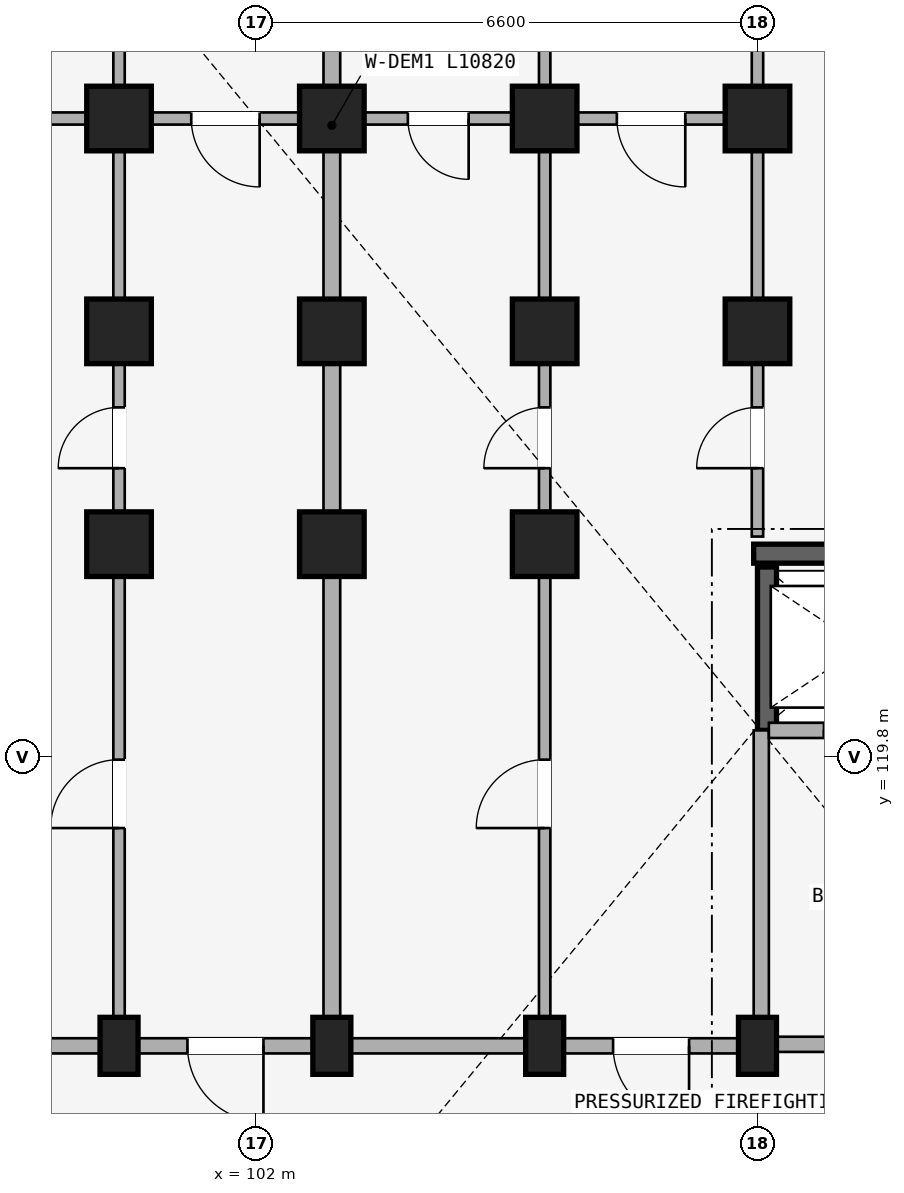
"""IFC4 building model, lengths in metres.
Left out: names, types, materials, properties, quantities, classifications, styles, units other than length and angle.
Written with IfcOpenShell. Run it as: python <this file> out.ifc"""

import sys

from ifc_helpers import new_model, si_unit, direction, frame, frame_2d, origin, origin_2d, place, context, subcontext, project, spatial, rectangle, extrude, element, fill, save


model = new_model("IFC4")
c1 = context("Model", 3, precision=1e-05, world=origin(), true_north=direction((0.0, 1.0)))
c2 = subcontext(c1, "Body", "Model", "MODEL_VIEW")
j1 = project(units=[si_unit("LENGTHUNIT", "METRE"), si_unit("PLANEANGLEUNIT", "RADIAN")], contexts=[c1])
p1 = place(None, origin())
s1 = spatial("IfcSite", under=j1, at=p1, CompositionType="ELEMENT")
p2 = place(p1, origin())
s2 = spatial("IfcBuilding", under=s1, at=p2, CompositionType="ELEMENT")
p3 = place(p2, origin())
s3 = spatial("IfcBuildingStorey", under=s2, at=p3, CompositionType="ELEMENT", Elevation=0.0)
p4 = place(p3, frame((111.35, 122.475, 0.0), z_axis=(0.0, 0.0, 1.0), x_axis=(-1.0, 0.0, 0.0)))
e1 = element("IfcWall", 1, at=p4, inside=s3, PredefinedType="SHEAR", context=c2, shape_type="SweptSolid", body=[
    extrude(rectangle(XDim=2.8, YDim=0.25, at=frame_2d((1.4, 0.0))), origin(), (0.0, 0.0, 1.0), 4.15),
])
p5 = place(p3, frame((108.725, 120.15, 0.0), z_axis=(0.0, 0.0, 1.0), x_axis=(0.0, 1.0, 0.0)))
e2 = element("IfcWall", 2, at=p5, inside=s3, PredefinedType="SHEAR", context=c2, shape_type="SweptSolid", body=[
    extrude(rectangle(XDim=2.15, YDim=0.25, at=frame_2d((1.075, 0.0))), origin(), (0.0, 0.0, 1.0), 4.15),
])
p6 = place(p3, frame((108.6, 116.0, 0.0), z_axis=(0.0, 0.0, 1.0), x_axis=(1.0, 0.0, 0.0)))
e3 = element("IfcColumn", 3, at=p6, inside=s3, PredefinedType="COLUMN", context=c2, shape_type="SweptSolid", body=[
    extrude(rectangle(XDim=0.5, YDim=0.75, at=origin_2d()), origin(), (0.0, 0.0, 1.0), 4.15),
])
for number, where, z_axis, x_axis in (
    (4, (108.6, 125.4, 0.0), (0.0, 0.0, 1.0), (1.0, 0.0, 0.0)),
    (5, (108.6, 128.2, 0.0), (0.0, 0.0, 1.0), (1.0, 0.0, 0.0)),
):
    element("IfcColumn", number, at=place(p3, frame(where, z_axis=z_axis, x_axis=x_axis)), inside=s3, PredefinedType="COLUMN", context=c2, shape_type="SweptSolid", body=[
        extrude(rectangle(XDim=0.85, YDim=0.85, at=origin_2d()), origin(), (0.0, 0.0, 1.0), 4.15),
    ])
p7 = place(p3, frame((105.8, 116.0, 0.0), z_axis=(0.0, 0.0, 1.0), x_axis=(1.0, 0.0, 0.0)))
e6 = element("IfcColumn", 6, at=p7, inside=s3, PredefinedType="COLUMN", context=c2, shape_type="SweptSolid", body=[
    extrude(rectangle(XDim=0.5, YDim=0.75, at=origin_2d()), origin(), (0.0, 0.0, 1.0), 4.15),
])
for number, where, z_axis, x_axis in (
    (7, (105.8, 122.6, 0.0), (0.0, 0.0, 1.0), (1.0, 0.0, 0.0)),
    (8, (105.8, 125.4, 0.0), (0.0, 0.0, 1.0), (1.0, 0.0, 0.0)),
    (9, (105.8, 128.2, 0.0), (0.0, 0.0, 1.0), (1.0, 0.0, 0.0)),
):
    element("IfcColumn", number, at=place(p3, frame(where, z_axis=z_axis, x_axis=x_axis)), inside=s3, PredefinedType="COLUMN", context=c2, shape_type="SweptSolid", body=[
        extrude(rectangle(XDim=0.85, YDim=0.85, at=origin_2d()), origin(), (0.0, 0.0, 1.0), 4.15),
    ])
p8 = place(p3, frame((103.0, 116.0, 0.0), z_axis=(0.0, 0.0, 1.0), x_axis=(1.0, 0.0, 0.0)))
e10 = element("IfcColumn", 10, at=p8, inside=s3, PredefinedType="COLUMN", context=c2, shape_type="SweptSolid", body=[
    extrude(rectangle(XDim=0.5, YDim=0.75, at=origin_2d()), origin(), (0.0, 0.0, 1.0), 4.15),
])
for number, where, z_axis, x_axis in (
    (11, (103.0, 122.6, 0.0), (0.0, 0.0, 1.0), (1.0, 0.0, 0.0)),
    (12, (103.0, 125.4, 0.0), (0.0, 0.0, 1.0), (1.0, 0.0, 0.0)),
    (13, (103.0, 128.2, 0.0), (0.0, 0.0, 1.0), (1.0, 0.0, 0.0)),
):
    element("IfcColumn", number, at=place(p3, frame(where, z_axis=z_axis, x_axis=x_axis)), inside=s3, PredefinedType="COLUMN", context=c2, shape_type="SweptSolid", body=[
        extrude(rectangle(XDim=0.85, YDim=0.85, at=origin_2d()), origin(), (0.0, 0.0, 1.0), 4.15),
    ])
p9 = place(p3, frame((100.2, 116.0, 0.0), z_axis=(0.0, 0.0, 1.0), x_axis=(1.0, 0.0, 0.0)))
e14 = element("IfcColumn", 14, at=p9, inside=s3, PredefinedType="COLUMN", context=c2, shape_type="SweptSolid", body=[
    extrude(rectangle(XDim=0.5, YDim=0.75, at=origin_2d()), origin(), (0.0, 0.0, 1.0), 4.15),
])
for number, where, z_axis, x_axis in (
    (15, (100.2, 122.6, 0.0), (0.0, 0.0, 1.0), (1.0, 0.0, 0.0)),
    (16, (100.2, 125.4, 0.0), (0.0, 0.0, 1.0), (1.0, 0.0, 0.0)),
    (17, (100.2, 128.2, 0.0), (0.0, 0.0, 1.0), (1.0, 0.0, 0.0)),
):
    element("IfcColumn", number, at=place(p3, frame(where, z_axis=z_axis, x_axis=x_axis)), inside=s3, PredefinedType="COLUMN", context=c2, shape_type="SweptSolid", body=[
        extrude(rectangle(XDim=0.85, YDim=0.85, at=origin_2d()), origin(), (0.0, 0.0, 1.0), 4.15),
    ])
p10 = place(p3, frame((114.3, 116.02, 0.0), z_axis=(0.0, 0.0, 1.0), x_axis=(-1.0, 0.0, 0.0)))
e18 = element("IfcWall", 18, at=p10, inside=s3, PredefinedType="STANDARD", context=c2, shape_type="SweptSolid", body=[
    extrude(rectangle(XDim=5.65, YDim=0.2, at=frame_2d((2.825, 0.0))), origin(), (0.0, 0.0, 1.0), 3.492),
])
p11 = place(p10, frame((1.923, 0.0, 0.0)))
e19 = element("IfcOpeningElement", 19, at=p11, cuts=e18, PredefinedType="OPENING", context=c2, shape_type="SweptSolid", body=[
    extrude(rectangle(XDim=1.24, YDim=2.15, at=frame_2d((0.62, 1.075))), frame((0.0, 0.11, 0.0), z_axis=(0.0, -1.0, 0.0), x_axis=(1.0, 0.0, 0.0)), (0.0, 0.0, 1.0), 0.22),
])
p12 = place(p3, frame((108.65, 116.02, 0.0), z_axis=(0.0, 0.0, 1.0), x_axis=(0.0, 1.0, 0.0)))
e20 = element("IfcWall", 20, at=p12, inside=s3, PredefinedType="STANDARD", context=c2, shape_type="SweptSolid", body=[
    extrude(rectangle(XDim=4.13, YDim=0.2, at=frame_2d((2.065, 0.0))), origin(), (0.0, 0.0, 1.0), 3.492),
])
p13 = place(p3, frame((111.3, 120.15, 0.0), z_axis=(0.0, 0.0, 1.0), x_axis=(-1.0, 0.0, 0.0)))
e21 = element("IfcWall", 21, at=p13, inside=s3, PredefinedType="STANDARD", context=c2, shape_type="SweptSolid", body=[
    extrude(rectangle(XDim=2.55, YDim=0.2, at=frame_2d((1.275, 0.0))), origin(), (0.0, 0.0, 1.0), 3.492),
])
p14 = place(p13, frame((0.725, 0.0, 0.0)))
e22 = element("IfcOpeningElement", 22, at=p14, cuts=e21, PredefinedType="OPENING", context=c2, shape_type="SweptSolid", body=[
    extrude(rectangle(XDim=1.1, YDim=2.15, at=frame_2d((0.55, 1.075))), frame((0.0, 0.11, 0.0), z_axis=(0.0, -1.0, 0.0), x_axis=(1.0, 0.0, 0.0)), (0.0, 0.0, 1.0), 0.22),
])
p15 = place(p3, frame((108.6, 116.0, 0.0), z_axis=(0.0, 0.0, 1.0), x_axis=(-1.0, 0.0, 0.0)))
e23 = element("IfcWall", 23, at=p15, inside=s3, PredefinedType="STANDARD", context=c2, shape_type="SweptSolid", body=[
    extrude(rectangle(XDim=2.8, YDim=0.2, at=frame_2d((1.4, 0.0))), origin(), (0.0, 0.0, 1.0), 3.492),
])
p16 = place(p15, frame((0.9, 0.0, 0.0)))
e24 = element("IfcOpeningElement", 24, at=p16, cuts=e23, PredefinedType="OPENING", context=c2, shape_type="SweptSolid", body=[
    extrude(rectangle(XDim=1.0, YDim=2.15, at=frame_2d((0.5, 1.075))), frame((0.0, 0.11, 0.0), z_axis=(0.0, -1.0, 0.0), x_axis=(1.0, 0.0, 0.0)), (0.0, 0.0, 1.0), 0.22),
])
p17 = place(p3, frame((108.52, 128.2, 0.0), z_axis=(0.0, 0.0, 1.0), x_axis=(-1.0, 0.0, 0.0)))
e25 = element("IfcWall", 25, at=p17, inside=s3, PredefinedType="PLUMBINGWALL", context=c2, shape_type="SweptSolid", body=[
    extrude(rectangle(XDim=2.64, YDim=0.16, at=frame_2d((1.32, 0.0))), origin(), (0.0, 0.0, 1.0), 3.492),
])
p18 = place(p17, frame((0.87, 0.0, 0.0)))
e26 = element("IfcOpeningElement", 26, at=p18, cuts=e25, PredefinedType="OPENING", context=c2, shape_type="SweptSolid", body=[
    extrude(rectangle(XDim=0.9, YDim=2.1, at=frame_2d((0.45, 1.05))), frame((0.0, 0.09, 0.0), z_axis=(0.0, -1.0, 0.0), x_axis=(1.0, 0.0, 0.0)), (0.0, 0.0, 1.0), 0.18),
])
p19 = place(p3, frame((105.8, 116.0, 0.0), z_axis=(0.0, 0.0, 1.0), x_axis=(-1.0, 0.0, 0.0)))
e27 = element("IfcWall", 27, at=p19, inside=s3, PredefinedType="STANDARD", context=c2, shape_type="SweptSolid", body=[
    extrude(rectangle(XDim=2.8, YDim=0.2, at=frame_2d((1.4, 0.0))), origin(), (0.0, 0.0, 1.0), 3.492),
])
p20 = place(p3, frame((105.72, 128.2, 0.0), z_axis=(0.0, 0.0, 1.0), x_axis=(-1.0, 0.0, 0.0)))
e28 = element("IfcWall", 28, at=p20, inside=s3, PredefinedType="PLUMBINGWALL", context=c2, shape_type="SweptSolid", body=[
    extrude(rectangle(XDim=2.64, YDim=0.16, at=frame_2d((1.32, 0.0))), origin(), (0.0, 0.0, 1.0), 3.492),
])
p21 = place(p20, frame((0.92, 0.0, 0.0)))
e29 = element("IfcOpeningElement", 29, at=p21, cuts=e28, PredefinedType="OPENING", context=c2, shape_type="SweptSolid", body=[
    extrude(rectangle(XDim=0.8, YDim=2.1, at=frame_2d((0.4, 1.05))), frame((0.0, 0.09, 0.0), z_axis=(0.0, -1.0, 0.0), x_axis=(1.0, 0.0, 0.0)), (0.0, 0.0, 1.0), 0.18),
])
p22 = place(p3, frame((103.0, 116.0, 0.0), z_axis=(0.0, 0.0, 1.0), x_axis=(-1.0, 0.0, 0.0)))
e30 = element("IfcWall", 30, at=p22, inside=s3, PredefinedType="STANDARD", context=c2, shape_type="SweptSolid", body=[
    extrude(rectangle(XDim=2.8, YDim=0.2, at=frame_2d((1.4, 0.0))), origin(), (0.0, 0.0, 1.0), 3.492),
])
p23 = place(p22, frame((0.9, 0.0, 0.0)))
e31 = element("IfcOpeningElement", 31, at=p23, cuts=e30, PredefinedType="OPENING", context=c2, shape_type="SweptSolid", body=[
    extrude(rectangle(XDim=1.0, YDim=2.15, at=frame_2d((0.5, 1.075))), frame((0.0, 0.11, 0.0), z_axis=(0.0, -1.0, 0.0), x_axis=(1.0, 0.0, 0.0)), (0.0, 0.0, 1.0), 0.22),
])
p24 = place(p3, frame((102.92, 128.2, 0.0), z_axis=(0.0, 0.0, 1.0), x_axis=(-1.0, 0.0, 0.0)))
e32 = element("IfcWall", 32, at=p24, inside=s3, PredefinedType="PLUMBINGWALL", context=c2, shape_type="SweptSolid", body=[
    extrude(rectangle(XDim=2.64, YDim=0.16, at=frame_2d((1.32, 0.0))), origin(), (0.0, 0.0, 1.0), 3.492),
])
p25 = place(p24, frame((0.87, 0.0, 0.0)))
e33 = element("IfcOpeningElement", 33, at=p25, cuts=e32, PredefinedType="OPENING", context=c2, shape_type="SweptSolid", body=[
    extrude(rectangle(XDim=0.9, YDim=2.1, at=frame_2d((0.45, 1.05))), frame((0.0, 0.09, 0.0), z_axis=(0.0, -1.0, 0.0), x_axis=(1.0, 0.0, 0.0)), (0.0, 0.0, 1.0), 0.18),
])
p26 = place(p3, frame((100.2, 116.0, 0.0), z_axis=(0.0, 0.0, 1.0), x_axis=(-1.0, 0.0, 0.0)))
e34 = element("IfcWall", 34, at=p26, inside=s3, PredefinedType="STANDARD", context=c2, shape_type="SweptSolid", body=[
    extrude(rectangle(XDim=2.8, YDim=0.2, at=frame_2d((1.4, 0.0))), origin(), (0.0, 0.0, 1.0), 3.492),
])
p27 = place(p3, frame((100.12, 128.2, 0.0), z_axis=(0.0, 0.0, 1.0), x_axis=(-1.0, 0.0, 0.0)))
e35 = element("IfcWall", 35, at=p27, inside=s3, PredefinedType="PLUMBINGWALL", context=c2, shape_type="SweptSolid", body=[
    extrude(rectangle(XDim=2.64, YDim=0.16, at=frame_2d((1.32, 0.0))), origin(), (0.0, 0.0, 1.0), 3.492),
])
p28 = place(p27, frame((0.92, 0.0, 0.0)))
e36 = element("IfcOpeningElement", 36, at=p28, cuts=e35, PredefinedType="OPENING", context=c2, shape_type="SweptSolid", body=[
    extrude(rectangle(XDim=0.8, YDim=2.1, at=frame_2d((0.4, 1.05))), frame((0.0, 0.09, 0.0), z_axis=(0.0, -1.0, 0.0), x_axis=(1.0, 0.0, 0.0)), (0.0, 0.0, 1.0), 0.18),
])
p29 = place(p3, frame((108.6, 122.7, 0.0), z_axis=(0.0, 0.0, 1.0), x_axis=(0.0, 1.0, 0.0)))
e37 = element("IfcWall", 37, at=p29, inside=s3, PredefinedType="PARTITIONING", context=c2, shape_type="SweptSolid", body=[
    extrude(rectangle(XDim=10.82, YDim=0.15, at=frame_2d((5.41, 0.0))), origin(), (0.0, 0.0, 1.0), 3.492),
])
p30 = place(p29, frame((0.899, 0.0, 0.0)))
e38 = element("IfcOpeningElement", 38, at=p30, cuts=e37, PredefinedType="OPENING", context=c2, shape_type="SweptSolid", body=[
    extrude(rectangle(XDim=0.8, YDim=2.1, at=frame_2d((0.4, 1.05))), frame((0.0, 0.085, 0.0), z_axis=(0.0, -1.0, 0.0), x_axis=(1.0, 0.0, 0.0)), (0.0, 0.0, 1.0), 0.17),
])
p31 = place(p3, frame((105.8, 116.05, 0.0), z_axis=(0.0, 0.0, 1.0), x_axis=(0.0, 1.0, 0.0)))
e39 = element("IfcWall", 39, at=p31, inside=s3, PredefinedType="PARTITIONING", context=c2, shape_type="SweptSolid", body=[
    extrude(rectangle(XDim=6.53, YDim=0.15, at=frame_2d((3.265, 0.0))), origin(), (0.0, 0.0, 1.0), 3.492),
])
p32 = place(p31, frame((2.815, 0.0, 0.0)))
e40 = element("IfcOpeningElement", 40, at=p32, cuts=e39, PredefinedType="OPENING", context=c2, shape_type="SweptSolid", body=[
    extrude(rectangle(XDim=0.9, YDim=2.1, at=frame_2d((0.45, 1.05))), frame((0.0, 0.085, 0.0), z_axis=(0.0, -1.0, 0.0), x_axis=(1.0, 0.0, 0.0)), (0.0, 0.0, 1.0), 0.17),
])
p33 = place(p3, frame((105.8, 122.7, 0.0), z_axis=(0.0, 0.0, 1.0), x_axis=(0.0, 1.0, 0.0)))
e41 = element("IfcWall", 41, at=p33, inside=s3, PredefinedType="PARTITIONING", context=c2, shape_type="SweptSolid", body=[
    extrude(rectangle(XDim=10.82, YDim=0.15, at=frame_2d((5.41, 0.0))), origin(), (0.0, 0.0, 1.0), 3.492),
])
p34 = place(p33, frame((0.899, 0.0, 0.0)))
e42 = element("IfcOpeningElement", 42, at=p34, cuts=e41, PredefinedType="OPENING", context=c2, shape_type="SweptSolid", body=[
    extrude(rectangle(XDim=0.8, YDim=2.1, at=frame_2d((0.4, 1.05))), frame((0.0, 0.085, 0.0), z_axis=(0.0, -1.0, 0.0), x_axis=(1.0, 0.0, 0.0)), (0.0, 0.0, 1.0), 0.17),
])
p35 = place(p3, frame((103.0, 116.05, 0.0), z_axis=(0.0, 0.0, 1.0), x_axis=(0.0, 1.0, 0.0)))
e43 = element("IfcWall", 43, at=p35, inside=s3, PredefinedType="STANDARD", context=c2, shape_type="SweptSolid", body=[
    extrude(rectangle(XDim=6.53, YDim=0.22, at=frame_2d((3.265, 0.0))), origin(), (0.0, 0.0, 1.0), 3.492),
])
p36 = place(p3, frame((103.0, 122.7, 0.0), z_axis=(0.0, 0.0, 1.0), x_axis=(0.0, 1.0, 0.0)))
e44 = element("IfcWall", 44, at=p36, inside=s3, PredefinedType="STANDARD", context=c2, shape_type="SweptSolid", body=[
    extrude(rectangle(XDim=10.82, YDim=0.22, at=frame_2d((5.41, 0.0))), origin(), (0.0, 0.0, 1.0), 3.492),
])
p37 = place(p3, frame((100.2, 116.05, 0.0), z_axis=(0.0, 0.0, 1.0), x_axis=(0.0, 1.0, 0.0)))
e45 = element("IfcWall", 45, at=p37, inside=s3, PredefinedType="PARTITIONING", context=c2, shape_type="SweptSolid", body=[
    extrude(rectangle(XDim=6.53, YDim=0.15, at=frame_2d((3.265, 0.0))), origin(), (0.0, 0.0, 1.0), 3.492),
])
p38 = place(p37, frame((2.815, 0.0, 0.0)))
e46 = element("IfcOpeningElement", 46, at=p38, cuts=e45, PredefinedType="OPENING", context=c2, shape_type="SweptSolid", body=[
    extrude(rectangle(XDim=0.9, YDim=2.1, at=frame_2d((0.45, 1.05))), frame((0.0, 0.085, 0.0), z_axis=(0.0, -1.0, 0.0), x_axis=(1.0, 0.0, 0.0)), (0.0, 0.0, 1.0), 0.17),
])
p39 = place(p3, frame((100.2, 122.7, 0.0), z_axis=(0.0, 0.0, 1.0), x_axis=(0.0, 1.0, 0.0)))
e47 = element("IfcWall", 47, at=p39, inside=s3, PredefinedType="PARTITIONING", context=c2, shape_type="SweptSolid", body=[
    extrude(rectangle(XDim=10.82, YDim=0.15, at=frame_2d((5.41, 0.0))), origin(), (0.0, 0.0, 1.0), 3.492),
])
p40 = place(p39, frame((0.899, 0.0, 0.0)))
e48 = element("IfcOpeningElement", 48, at=p40, cuts=e47, PredefinedType="OPENING", context=c2, shape_type="SweptSolid", body=[
    extrude(rectangle(XDim=0.8, YDim=2.1, at=frame_2d((0.4, 1.05))), frame((0.0, 0.085, 0.0), z_axis=(0.0, -1.0, 0.0), x_axis=(1.0, 0.0, 0.0)), (0.0, 0.0, 1.0), 0.17),
])
p41 = place(p14, origin())
e49 = element("IfcDoor", 49, at=p41, inside=s3, OperationType="SLIDING_TO_LEFT", PredefinedType="DOOR", context=c2, shape_type="SweptSolid", body=[
    extrude(rectangle(XDim=1.1, YDim=2.15, at=frame_2d((0.55, 1.075))), frame((0.0, 0.025, 0.0), z_axis=(0.0, -1.0, 0.0), x_axis=(1.0, 0.0, 0.0)), (0.0, 0.0, 1.0), 0.05),
])
fill(e22, e49)
p42 = place(p18, origin())
e50 = element("IfcDoor", 50, at=p42, inside=s3, OperationType="SINGLE_SWING_LEFT", PredefinedType="DOOR", context=c2, shape_type="SweptSolid", body=[
    extrude(rectangle(XDim=0.9, YDim=2.1, at=frame_2d((0.45, 1.05))), frame((0.0, 0.025, 0.0), z_axis=(0.0, -1.0, 0.0), x_axis=(1.0, 0.0, 0.0)), (0.0, 0.0, 1.0), 0.05),
])
fill(e26, e50)
p43 = place(p16, frame((1.0, 0.0, 0.0), z_axis=(0.0, 0.0, 1.0), x_axis=(-1.0, 0.0, 0.0)))
e51 = element("IfcDoor", 51, at=p43, inside=s3, OperationType="SINGLE_SWING_RIGHT", PredefinedType="DOOR", context=c2, shape_type="SweptSolid", body=[
    extrude(rectangle(XDim=1.0, YDim=2.15, at=frame_2d((0.5, 1.075))), frame((0.0, 0.025, 0.0), z_axis=(0.0, -1.0, 0.0), x_axis=(1.0, 0.0, 0.0)), (0.0, 0.0, 1.0), 0.05),
])
fill(e24, e51)
p44 = place(p21, origin())
e52 = element("IfcDoor", 52, at=p44, inside=s3, OperationType="SINGLE_SWING_LEFT", PredefinedType="DOOR", context=c2, shape_type="SweptSolid", body=[
    extrude(rectangle(XDim=0.8, YDim=2.1, at=frame_2d((0.4, 1.05))), frame((0.0, 0.025, 0.0), z_axis=(0.0, -1.0, 0.0), x_axis=(1.0, 0.0, 0.0)), (0.0, 0.0, 1.0), 0.05),
])
fill(e29, e52)
p45 = place(p25, origin())
e53 = element("IfcDoor", 53, at=p45, inside=s3, OperationType="SINGLE_SWING_LEFT", PredefinedType="DOOR", context=c2, shape_type="SweptSolid", body=[
    extrude(rectangle(XDim=0.9, YDim=2.1, at=frame_2d((0.45, 1.05))), frame((0.0, 0.025, 0.0), z_axis=(0.0, -1.0, 0.0), x_axis=(1.0, 0.0, 0.0)), (0.0, 0.0, 1.0), 0.05),
])
fill(e33, e53)
p46 = place(p23, frame((1.0, 0.0, 0.0), z_axis=(0.0, 0.0, 1.0), x_axis=(-1.0, 0.0, 0.0)))
e54 = element("IfcDoor", 54, at=p46, inside=s3, OperationType="SINGLE_SWING_RIGHT", PredefinedType="DOOR", context=c2, shape_type="SweptSolid", body=[
    extrude(rectangle(XDim=1.0, YDim=2.15, at=frame_2d((0.5, 1.075))), frame((0.0, 0.025, 0.0), z_axis=(0.0, -1.0, 0.0), x_axis=(1.0, 0.0, 0.0)), (0.0, 0.0, 1.0), 0.05),
])
fill(e31, e54)
p47 = place(p30, frame((0.8, 0.0, 0.0), z_axis=(0.0, 0.0, 1.0), x_axis=(-1.0, 0.0, 0.0)))
e55 = element("IfcDoor", 55, at=p47, inside=s3, OperationType="SINGLE_SWING_RIGHT", PredefinedType="DOOR", context=c2, shape_type="SweptSolid", body=[
    extrude(rectangle(XDim=0.8, YDim=2.1, at=frame_2d((0.4, 1.05))), frame((0.0, 0.025, 0.0), z_axis=(0.0, -1.0, 0.0), x_axis=(1.0, 0.0, 0.0)), (0.0, 0.0, 1.0), 0.05),
])
fill(e38, e55)
p48 = place(p32, frame((0.9, 0.0, 0.0), z_axis=(0.0, 0.0, 1.0), x_axis=(-1.0, 0.0, 0.0)))
e56 = element("IfcDoor", 56, at=p48, inside=s3, OperationType="SINGLE_SWING_RIGHT", PredefinedType="DOOR", context=c2, shape_type="SweptSolid", body=[
    extrude(rectangle(XDim=0.9, YDim=2.1, at=frame_2d((0.45, 1.05))), frame((0.0, 0.025, 0.0), z_axis=(0.0, -1.0, 0.0), x_axis=(1.0, 0.0, 0.0)), (0.0, 0.0, 1.0), 0.05),
])
fill(e40, e56)
p49 = place(p34, origin())
e57 = element("IfcDoor", 57, at=p49, inside=s3, OperationType="SINGLE_SWING_LEFT", PredefinedType="DOOR", context=c2, shape_type="SweptSolid", body=[
    extrude(rectangle(XDim=0.8, YDim=2.1, at=frame_2d((0.4, 1.05))), frame((0.0, 0.025, 0.0), z_axis=(0.0, -1.0, 0.0), x_axis=(1.0, 0.0, 0.0)), (0.0, 0.0, 1.0), 0.05),
])
fill(e42, e57)
p50 = place(p38, origin())
e58 = element("IfcDoor", 58, at=p50, inside=s3, OperationType="SINGLE_SWING_LEFT", PredefinedType="DOOR", context=c2, shape_type="SweptSolid", body=[
    extrude(rectangle(XDim=0.9, YDim=2.1, at=frame_2d((0.45, 1.05))), frame((0.0, 0.025, 0.0), z_axis=(0.0, -1.0, 0.0), x_axis=(1.0, 0.0, 0.0)), (0.0, 0.0, 1.0), 0.05),
])
fill(e46, e58)
p51 = place(p40, frame((0.8, 0.0, 0.0), z_axis=(0.0, 0.0, 1.0), x_axis=(-1.0, 0.0, 0.0)))
e59 = element("IfcDoor", 59, at=p51, inside=s3, OperationType="SINGLE_SWING_RIGHT", PredefinedType="DOOR", context=c2, shape_type="SweptSolid", body=[
    extrude(rectangle(XDim=0.8, YDim=2.1, at=frame_2d((0.4, 1.05))), frame((0.0, 0.025, 0.0), z_axis=(0.0, -1.0, 0.0), x_axis=(1.0, 0.0, 0.0)), (0.0, 0.0, 1.0), 0.05),
])
fill(e48, e59)
save(model, sys.argv[1])
